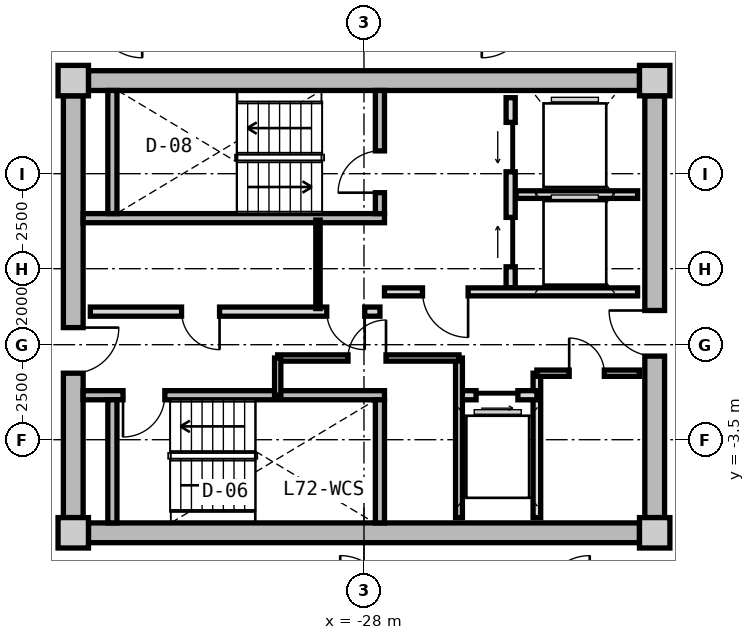
"""IFC4 building model, lengths in metres.
Left out: names, types, materials, properties, quantities, classifications, styles, units other than length and angle.
Written with IfcOpenShell. Run it as: python <this file> out.ifc"""

import sys

from ifc_helpers import new_model, si_unit, direction, frame, frame_2d, origin, origin_2d, place, context, subcontext, project, spatial, rectangle, extrude, source, transform, mapped, element, fill, save


model = new_model("IFC4")
c1 = context("Model", 3, precision=1e-05, world=origin(), true_north=direction((0.0, 1.0)))
c2 = subcontext(c1, "Body", "Model", "MODEL_VIEW")
j1 = project(units=[si_unit("LENGTHUNIT", "METRE"), si_unit("PLANEANGLEUNIT", "RADIAN")], contexts=[c1])
p1 = place(None, origin())
s1 = spatial("IfcSite", under=j1, at=p1, CompositionType="ELEMENT")
p2 = place(p1, origin())
s2 = spatial("IfcBuilding", under=s1, at=p2, CompositionType="ELEMENT")
p3 = place(p2, frame((0.0, 0.0, 232.2)))
s3 = spatial("IfcBuildingStorey", under=s2, at=p3, CompositionType="ELEMENT", Elevation=232.2)
m1 = source(origin(), c2, "Body", "SweptSolid", [
    extrude(rectangle(XDim=0.8, YDim=0.8, at=origin_2d()), origin(), (0.0, 0.0, 1.0), 3.05),
])
for number, where, z_axis, x_axis in (
    (1, (-35.65, -5.95, 0.0), (0.0, 0.0, 1.0), (1.0, 0.0, 0.0)),
    (2, (-20.35, -5.95, 0.0), (0.0, 0.0, 1.0), (1.0, 0.0, 0.0)),
    (3, (-20.35, 5.95, 0.0), (0.0, 0.0, 1.0), (1.0, 0.0, 0.0)),
    (4, (-35.65, 5.95, 0.0), (0.0, 0.0, 1.0), (1.0, 0.0, 0.0)),
):
    element("IfcColumn", number, at=place(p3, frame(where, z_axis=z_axis, x_axis=x_axis)), inside=s3, PredefinedType="COLUMN", context=c2, shape_type="MappedRepresentation", body=[
        mapped(m1, transform((0.0, 0.0, 0.0), x_axis=(1.0, 0.0, 0.0), y_axis=(0.0, 1.0, 0.0), z_axis=(0.0, 0.0, 1.0), scale=1.0)),
    ])
m2 = source(origin(), c2, "Body", "SweptSolid", [
    extrude(rectangle(XDim=14.5, YDim=0.52, at=frame_2d((7.25, 0.0))), origin(), (0.0, 0.0, 1.0), 2.81),
])
for number, where, z_axis, x_axis in (
    (5, (-35.25, 5.95, 0.0), (0.0, 0.0, 1.0), (1.0, 0.0, 0.0)),
    (6, (-20.75, -5.95, 0.0), (0.0, 0.0, 1.0), (-1.0, 0.0, 0.0)),
):
    element("IfcWall", number, at=place(p3, frame(where, z_axis=z_axis, x_axis=x_axis)), inside=s3, PredefinedType="SHEAR", context=c2, shape_type="MappedRepresentation", body=[
        mapped(m2, transform((0.0, 0.0, 0.0), x_axis=(1.0, 0.0, 0.0), y_axis=(0.0, 1.0, 0.0), z_axis=(0.0, 0.0, 1.0), scale=1.0)),
    ])
m3 = source(origin(), c2, "Body", "SweptSolid", [
    extrude(rectangle(XDim=11.1, YDim=0.52, at=frame_2d((5.55, 0.0))), origin(), (0.0, 0.0, 1.0), 2.81),
])
p4 = place(p3, frame((-35.65, -5.55, 0.0), z_axis=(0.0, 0.0, 1.0), x_axis=(0.0, 1.0, 0.0)))
e7 = element("IfcWall", 7, at=p4, inside=s3, PredefinedType="SHEAR", context=c2, shape_type="MappedRepresentation", body=[
    mapped(m3, transform((0.0, 0.0, 0.0), x_axis=(1.0, 0.0, 0.0), y_axis=(0.0, 1.0, 0.0), z_axis=(0.0, 0.0, 1.0), scale=1.0)),
])
p5 = place(p4, frame((3.8, 0.0, 0.0)))
e8 = element("IfcOpeningElement", 8, at=p5, cuts=e7, PredefinedType="OPENING", context=c2, shape_type="SweptSolid", body=[
    extrude(rectangle(XDim=1.2, YDim=2.15, at=frame_2d((0.6, 1.075))), frame((0.0, 0.27, 0.0), z_axis=(0.0, -1.0, 0.0), x_axis=(1.0, 0.0, 0.0)), (0.0, 0.0, 1.0), 0.54),
])
p6 = place(p3, frame((-20.35, 5.55, 0.0), z_axis=(0.0, 0.0, 1.0), x_axis=(0.0, -1.0, 0.0)))
e9 = element("IfcWall", 9, at=p6, inside=s3, PredefinedType="SHEAR", context=c2, shape_type="MappedRepresentation", body=[
    mapped(m3, transform((0.0, 0.0, 0.0), x_axis=(1.0, 0.0, 0.0), y_axis=(0.0, 1.0, 0.0), z_axis=(0.0, 0.0, 1.0), scale=1.0)),
])
p7 = place(p6, frame((5.65, 0.0, 0.0)))
e10 = element("IfcOpeningElement", 10, at=p7, cuts=e9, PredefinedType="OPENING", context=c2, shape_type="SweptSolid", body=[
    extrude(rectangle(XDim=1.2, YDim=2.15, at=frame_2d((0.6, 1.075))), frame((0.0, 0.27, 0.0), z_axis=(0.0, -1.0, 0.0), x_axis=(1.0, 0.0, 0.0)), (0.0, 0.0, 1.0), 0.54),
])
m4 = source(origin(), c2, "Body", "SweptSolid", [
    extrude(rectangle(XDim=7.93, YDim=0.24, at=frame_2d((3.965, 0.0))), origin(), (0.0, 0.0, 1.0), 2.81),
])
p8 = place(p3, frame((-35.39, 2.33, 0.0), z_axis=(0.0, 0.0, 1.0), x_axis=(1.0, 0.0, 0.0)))
e11 = element("IfcWall", 11, at=p8, inside=s3, PredefinedType="PARTITIONING", context=c2, shape_type="MappedRepresentation", body=[
    mapped(m4, transform((0.0, 0.0, 0.0), x_axis=(1.0, 0.0, 0.0), y_axis=(0.0, 1.0, 0.0), z_axis=(0.0, 0.0, 1.0), scale=1.0)),
])
m5 = source(origin(), c2, "Body", "SweptSolid", [
    extrude(rectangle(XDim=3.24, YDim=0.24, at=frame_2d((1.62, 0.0))), origin(), (0.0, 0.0, 1.0), 2.81),
])
p9 = place(p3, frame((-34.62, 2.45, 0.0), z_axis=(0.0, 0.0, 1.0), x_axis=(0.0, 1.0, 0.0)))
e12 = element("IfcWall", 12, at=p9, inside=s3, PredefinedType="PARTITIONING", context=c2, shape_type="MappedRepresentation", body=[
    mapped(m5, transform((0.0, 0.0, 0.0), x_axis=(1.0, 0.0, 0.0), y_axis=(0.0, 1.0, 0.0), z_axis=(0.0, 0.0, 1.0), scale=1.0)),
])
p10 = place(p3, frame((-27.58, 2.45, 0.0), z_axis=(0.0, 0.0, 1.0), x_axis=(0.0, 1.0, 0.0)))
e13 = element("IfcWall", 13, at=p10, inside=s3, PredefinedType="PARTITIONING", context=c2, shape_type="MappedRepresentation", body=[
    mapped(m5, transform((0.0, 0.0, 0.0), x_axis=(1.0, 0.0, 0.0), y_axis=(0.0, 1.0, 0.0), z_axis=(0.0, 0.0, 1.0), scale=1.0)),
])
p11 = place(p10, frame((0.55, 0.0, 0.0)))
e14 = element("IfcOpeningElement", 14, at=p11, cuts=e13, PredefinedType="OPENING", context=c2, shape_type="SweptSolid", body=[
    extrude(rectangle(XDim=1.1, YDim=2.15, at=frame_2d((0.55, 1.075))), frame((0.0, 0.13, 0.0), z_axis=(0.0, -1.0, 0.0), x_axis=(1.0, 0.0, 0.0)), (0.0, 0.0, 1.0), 0.26),
])
p12 = place(p3, frame((-35.39, -2.33, 0.0), z_axis=(0.0, 0.0, 1.0), x_axis=(1.0, 0.0, 0.0)))
e15 = element("IfcWall", 15, at=p12, inside=s3, PredefinedType="PARTITIONING", context=c2, shape_type="MappedRepresentation", body=[
    mapped(m4, transform((0.0, 0.0, 0.0), x_axis=(1.0, 0.0, 0.0), y_axis=(0.0, 1.0, 0.0), z_axis=(0.0, 0.0, 1.0), scale=1.0)),
])
p13 = place(p12, frame((1.05, 0.0, 0.0)))
e16 = element("IfcOpeningElement", 16, at=p13, cuts=e15, PredefinedType="OPENING", context=c2, shape_type="SweptSolid", body=[
    extrude(rectangle(XDim=1.1, YDim=2.15, at=frame_2d((0.55, 1.075))), frame((0.0, 0.13, 0.0), z_axis=(0.0, -1.0, 0.0), x_axis=(1.0, 0.0, 0.0)), (0.0, 0.0, 1.0), 0.26),
])
for number, where, z_axis, x_axis in (
    (17, (-34.62, -5.69, 0.0), (0.0, 0.0, 1.0), (0.0, 1.0, 0.0)),
    (18, (-27.58, -5.69, 0.0), (0.0, 0.0, 1.0), (0.0, 1.0, 0.0)),
):
    element("IfcWall", number, at=place(p3, frame(where, z_axis=z_axis, x_axis=x_axis)), inside=s3, PredefinedType="PARTITIONING", context=c2, shape_type="MappedRepresentation", body=[
        mapped(m5, transform((0.0, 0.0, 0.0), x_axis=(1.0, 0.0, 0.0), y_axis=(0.0, 1.0, 0.0), z_axis=(0.0, 0.0, 1.0), scale=1.0)),
    ])
m6 = source(origin(), c2, "Body", "SweptSolid", [
    extrude(rectangle(XDim=5.0, YDim=0.24, at=frame_2d((2.5, 0.0))), origin(), (0.0, 0.0, 1.0), 2.795),
])
p14 = place(p3, frame((-24.14, 0.5, 0.0), z_axis=(0.0, 0.0, 1.0), x_axis=(0.0, 1.0, 0.0)))
e19 = element("IfcWall", 19, at=p14, inside=s3, PredefinedType="PARTITIONING", context=c2, shape_type="MappedRepresentation", body=[
    mapped(m6, transform((0.0, 0.0, 0.0), x_axis=(1.0, 0.0, 0.0), y_axis=(0.0, 1.0, 0.0), z_axis=(0.0, 0.0, 1.0), scale=1.0)),
])
p15 = place(p14, frame((3.05, 0.0, 0.0)))
e20 = element("IfcOpeningElement", 20, at=p15, cuts=e19, PredefinedType="OPENING", context=c2, shape_type="SweptSolid", body=[
    extrude(rectangle(XDim=1.3, YDim=2.2, at=frame_2d((0.65, 1.1))), frame((0.0, 0.13, 0.0), z_axis=(0.0, -1.0, 0.0), x_axis=(1.0, 0.0, 0.0)), (0.0, 0.0, 1.0), 0.26),
])
p16 = place(p14, frame((0.55, 0.0, 0.0)))
e21 = element("IfcOpeningElement", 21, at=p16, cuts=e19, PredefinedType="OPENING", context=c2, shape_type="SweptSolid", body=[
    extrude(rectangle(XDim=1.3, YDim=2.2, at=frame_2d((0.65, 1.1))), frame((0.0, 0.13, 0.0), z_axis=(0.0, -1.0, 0.0), x_axis=(1.0, 0.0, 0.0)), (0.0, 0.0, 1.0), 0.26),
])
m7 = source(origin(), c2, "Body", "SweptSolid", [
    extrude(rectangle(XDim=3.2, YDim=0.2, at=frame_2d((1.6, 0.0))), origin(), (0.0, 0.0, 1.0), 2.795),
])
p17 = place(p3, frame((-24.0, 2.95, 0.0), z_axis=(0.0, 0.0, 1.0), x_axis=(1.0, 0.0, 0.0)))
e22 = element("IfcWall", 22, at=p17, inside=s3, PredefinedType="PARTITIONING", context=c2, shape_type="MappedRepresentation", body=[
    mapped(m7, transform((0.0, 0.0, 0.0), x_axis=(1.0, 0.0, 0.0), y_axis=(0.0, 1.0, 0.0), z_axis=(0.0, 0.0, 1.0), scale=1.0)),
])
m8 = source(origin(), c2, "Body", "SweptSolid", [
    extrude(rectangle(XDim=6.66, YDim=0.21, at=frame_2d((3.33, 0.0))), origin(), (0.0, 0.0, 1.0), 2.795),
])
p18 = place(p3, frame((-27.46, 0.39, 0.0), z_axis=(0.0, 0.0, 1.0), x_axis=(1.0, 0.0, 0.0)))
e23 = element("IfcWall", 23, at=p18, inside=s3, PredefinedType="PARTITIONING", context=c2, shape_type="MappedRepresentation", body=[
    mapped(m8, transform((0.0, 0.0, 0.0), x_axis=(1.0, 0.0, 0.0), y_axis=(0.0, 1.0, 0.0), z_axis=(0.0, 0.0, 1.0), scale=1.0)),
])
p19 = place(p18, frame((1.0, 0.0, 0.0)))
e24 = element("IfcOpeningElement", 24, at=p19, cuts=e23, PredefinedType="OPENING", context=c2, shape_type="SweptSolid", body=[
    extrude(rectangle(XDim=1.2, YDim=2.15, at=frame_2d((0.6, 1.075))), frame((0.0, 0.115, 0.0), z_axis=(0.0, -1.0, 0.0), x_axis=(1.0, 0.0, 0.0)), (0.0, 0.0, 1.0), 0.23),
])
m9 = source(origin(), c2, "Body", "SweptSolid", [
    extrude(rectangle(XDim=7.62, YDim=0.24, at=frame_2d((3.81, 0.0))), origin(), (0.0, 0.0, 1.0), 2.795),
])
p20 = place(p3, frame((-35.2, -0.13, 0.0), z_axis=(0.0, 0.0, 1.0), x_axis=(1.0, 0.0, 0.0)))
e25 = element("IfcWall", 25, at=p20, inside=s3, PredefinedType="PARTITIONING", context=c2, shape_type="MappedRepresentation", body=[
    mapped(m9, transform((0.0, 0.0, 0.0), x_axis=(1.0, 0.0, 0.0), y_axis=(0.0, 1.0, 0.0), z_axis=(0.0, 0.0, 1.0), scale=1.0)),
])
p21 = place(p20, frame((6.22, 0.0, 0.0)))
e26 = element("IfcOpeningElement", 26, at=p21, cuts=e25, PredefinedType="OPENING", context=c2, shape_type="SweptSolid", body=[
    extrude(rectangle(XDim=1.0, YDim=2.1, at=frame_2d((0.5, 1.05))), frame((0.0, 0.13, 0.0), z_axis=(0.0, -1.0, 0.0), x_axis=(1.0, 0.0, 0.0)), (0.0, 0.0, 1.0), 0.26),
])
p22 = place(p20, frame((2.4, 0.0, 0.0)))
e27 = element("IfcOpeningElement", 27, at=p22, cuts=e25, PredefinedType="OPENING", context=c2, shape_type="SweptSolid", body=[
    extrude(rectangle(XDim=1.0, YDim=2.1, at=frame_2d((0.5, 1.05))), frame((0.0, 0.13, 0.0), z_axis=(0.0, -1.0, 0.0), x_axis=(1.0, 0.0, 0.0)), (0.0, 0.0, 1.0), 0.26),
])
m10 = source(origin(), c2, "Body", "SweptSolid", [
    extrude(rectangle(XDim=2.33, YDim=0.115, at=frame_2d((1.165, 0.0))), origin(), (0.0, 0.0, 1.0), 2.795),
])
p23 = place(p3, frame((-29.21, -0.05, 0.0), z_axis=(0.0, 0.0, 1.0), x_axis=(0.0, 1.0, 0.0)))
e28 = element("IfcWall", 28, at=p23, inside=s3, PredefinedType="PARTITIONING", context=c2, shape_type="MappedRepresentation", body=[
    mapped(m10, transform((0.0, 0.0, 0.0), x_axis=(1.0, 0.0, 0.0), y_axis=(0.0, 1.0, 0.0), z_axis=(0.0, 0.0, 1.0), scale=1.0)),
])
m11 = source(origin(), c2, "Body", "SweptSolid", [
    extrude(rectangle(XDim=3.8, YDim=0.2, at=frame_2d((1.9, 0.0))), origin(), (0.0, 0.0, 1.0), 2.795),
])
p24 = place(p3, frame((-23.45, -5.55, 0.0), z_axis=(0.0, 0.0, 1.0), x_axis=(0.0, 1.0, 0.0)))
e29 = element("IfcWall", 29, at=p24, inside=s3, PredefinedType="PARTITIONING", context=c2, shape_type="MappedRepresentation", body=[
    mapped(m11, transform((0.0, 0.0, 0.0), x_axis=(1.0, 0.0, 0.0), y_axis=(0.0, 1.0, 0.0), z_axis=(0.0, 0.0, 1.0), scale=1.0)),
])
m12 = source(origin(), c2, "Body", "SweptSolid", [
    extrude(rectangle(XDim=2.05, YDim=0.24, at=frame_2d((1.025, 0.0))), origin(), (0.0, 0.0, 1.0), 2.795),
])
p25 = place(p3, frame((-25.5, -2.33, 0.0), z_axis=(0.0, 0.0, 1.0), x_axis=(1.0, 0.0, 0.0)))
e30 = element("IfcWall", 30, at=p25, inside=s3, PredefinedType="PARTITIONING", context=c2, shape_type="MappedRepresentation", body=[
    mapped(m12, transform((0.0, 0.0, 0.0), x_axis=(1.0, 0.0, 0.0), y_axis=(0.0, 1.0, 0.0), z_axis=(0.0, 0.0, 1.0), scale=1.0)),
])
p26 = place(p25, frame((0.45, 0.0, 0.0)))
e31 = element("IfcOpeningElement", 31, at=p26, cuts=e30, PredefinedType="OPENING", context=c2, shape_type="SweptSolid", body=[
    extrude(rectangle(XDim=1.1, YDim=2.2, at=frame_2d((0.55, 1.1))), frame((0.0, 0.13, 0.0), z_axis=(0.0, -1.0, 0.0), x_axis=(1.0, 0.0, 0.0)), (0.0, 0.0, 1.0), 0.26),
])
m13 = source(origin(), c2, "Body", "SweptSolid", [
    extrude(rectangle(XDim=4.2, YDim=0.18, at=frame_2d((2.1, 0.0))), origin(), (0.0, 0.0, 1.0), 2.795),
])
p27 = place(p3, frame((-25.5, -5.55, 0.0), z_axis=(0.0, 0.0, 1.0), x_axis=(0.0, 1.0, 0.0)))
e32 = element("IfcWall", 32, at=p27, inside=s3, PredefinedType="PARTITIONING", context=c2, shape_type="MappedRepresentation", body=[
    mapped(m13, transform((0.0, 0.0, 0.0), x_axis=(1.0, 0.0, 0.0), y_axis=(0.0, 1.0, 0.0), z_axis=(0.0, 0.0, 1.0), scale=1.0)),
])
m14 = source(origin(), c2, "Body", "SweptSolid", [
    extrude(rectangle(XDim=4.77, YDim=0.165, at=frame_2d((2.385, 0.0))), origin(), (0.0, 0.0, 1.0), 2.795),
])
p28 = place(p3, frame((-30.27, -1.35, 0.0), z_axis=(0.0, 0.0, 1.0), x_axis=(1.0, 0.0, 0.0)))
e33 = element("IfcWall", 33, at=p28, inside=s3, PredefinedType="PARTITIONING", context=c2, shape_type="MappedRepresentation", body=[
    mapped(m14, transform((0.0, 0.0, 0.0), x_axis=(1.0, 0.0, 0.0), y_axis=(0.0, 1.0, 0.0), z_axis=(0.0, 0.0, 1.0), scale=1.0)),
])
p29 = place(p28, frame((1.85, 0.0, 0.0)))
e34 = element("IfcOpeningElement", 34, at=p29, cuts=e33, PredefinedType="OPENING", context=c2, shape_type="SweptSolid", body=[
    extrude(rectangle(XDim=1.0, YDim=2.1, at=frame_2d((0.5, 1.05))), frame((0.0, 0.093, 0.0), z_axis=(0.0, -1.0, 0.0), x_axis=(1.0, 0.0, 0.0)), (0.0, 0.0, 1.0), 0.185),
])
m15 = source(origin(), c2, "Body", "SweptSolid", [
    extrude(rectangle(XDim=0.98, YDim=0.165, at=frame_2d((0.49, 0.0))), origin(), (0.0, 0.0, 1.0), 2.795),
])
p30 = place(p3, frame((-30.27, -2.33, 0.0), z_axis=(0.0, 0.0, 1.0), x_axis=(0.0, 1.0, 0.0)))
e35 = element("IfcWall", 35, at=p30, inside=s3, PredefinedType="PARTITIONING", context=c2, shape_type="MappedRepresentation", body=[
    mapped(m15, transform((0.0, 0.0, 0.0), x_axis=(1.0, 0.0, 0.0), y_axis=(0.0, 1.0, 0.0), z_axis=(0.0, 0.0, 1.0), scale=1.0)),
])
m16 = source(origin(), c2, "Body", "SweptSolid", [
    extrude(rectangle(XDim=2.7, YDim=0.165, at=frame_2d((1.35, 0.0))), origin(), (0.0, 0.0, 1.0), 2.795),
])
p31 = place(p3, frame((-23.45, -1.75, 0.0), z_axis=(0.0, 0.0, 1.0), x_axis=(1.0, 0.0, 0.0)))
e36 = element("IfcWall", 36, at=p31, inside=s3, PredefinedType="PARTITIONING", context=c2, shape_type="MappedRepresentation", body=[
    mapped(m16, transform((0.0, 0.0, 0.0), x_axis=(1.0, 0.0, 0.0), y_axis=(0.0, 1.0, 0.0), z_axis=(0.0, 0.0, 1.0), scale=1.0)),
])
p32 = place(p31, frame((0.85, 0.0, 0.0)))
e37 = element("IfcOpeningElement", 37, at=p32, cuts=e36, PredefinedType="OPENING", context=c2, shape_type="SweptSolid", body=[
    extrude(rectangle(XDim=0.925, YDim=2.1, at=frame_2d((0.462, 1.05))), frame((0.0, 0.093, 0.0), z_axis=(0.0, -1.0, 0.0), x_axis=(1.0, 0.0, 0.0)), (0.0, 0.0, 1.0), 0.185),
])
m17 = source(origin(), c2, "Body", "SweptSolid", [
    extrude(rectangle(XDim=1.1, YDim=2.15, at=frame_2d((0.55, 1.075))), frame((0.0, 0.025, 0.0), z_axis=(0.0, -1.0, 0.0), x_axis=(1.0, 0.0, 0.0)), (0.0, 0.0, 1.0), 0.05),
])
p33 = place(p11, origin())
e38 = element("IfcDoor", 38, at=p33, inside=s3, OperationType="SINGLE_SWING_LEFT", PredefinedType="DOOR", context=c2, shape_type="MappedRepresentation", body=[
    mapped(m17, transform((0.0, 0.0, 0.0), x_axis=(1.0, 0.0, 0.0), y_axis=(0.0, 1.0, 0.0), z_axis=(0.0, 0.0, 1.0), scale=1.0)),
])
fill(e14, e38)
p34 = place(p13, frame((1.1, 0.0, 0.0), z_axis=(0.0, 0.0, 1.0), x_axis=(-1.0, 0.0, 0.0)))
e39 = element("IfcDoor", 39, at=p34, inside=s3, OperationType="SINGLE_SWING_RIGHT", PredefinedType="DOOR", context=c2, shape_type="MappedRepresentation", body=[
    mapped(m17, transform((0.0, 0.0, 0.0), x_axis=(1.0, 0.0, 0.0), y_axis=(0.0, 1.0, 0.0), z_axis=(0.0, 0.0, 1.0), scale=1.0)),
])
fill(e16, e39)
m18 = source(origin(), c2, "Body", "SweptSolid", [
    extrude(rectangle(XDim=1.3, YDim=2.2, at=frame_2d((0.65, 1.1))), frame((0.0, 0.025, 0.0), z_axis=(0.0, -1.0, 0.0), x_axis=(1.0, 0.0, 0.0)), (0.0, 0.0, 1.0), 0.05),
])
p35 = place(p15, origin())
e40 = element("IfcDoor", 40, at=p35, inside=s3, OperationType="SLIDING_TO_LEFT", PredefinedType="DOOR", context=c2, shape_type="MappedRepresentation", body=[
    mapped(m18, transform((0.0, 0.0, 0.0), x_axis=(1.0, 0.0, 0.0), y_axis=(0.0, 1.0, 0.0), z_axis=(0.0, 0.0, 1.0), scale=1.0)),
])
fill(e20, e40)
p36 = place(p16, origin())
e41 = element("IfcDoor", 41, at=p36, inside=s3, OperationType="SLIDING_TO_RIGHT", PredefinedType="DOOR", context=c2, shape_type="MappedRepresentation", body=[
    mapped(m18, transform((0.0, 0.0, 0.0), x_axis=(1.0, 0.0, 0.0), y_axis=(0.0, 1.0, 0.0), z_axis=(0.0, 0.0, 1.0), scale=1.0)),
])
fill(e21, e41)
m19 = source(origin(), c2, "Body", "SweptSolid", [
    extrude(rectangle(XDim=1.2, YDim=2.15, at=frame_2d((0.6, 1.075))), frame((0.0, 0.025, 0.0), z_axis=(0.0, -1.0, 0.0), x_axis=(1.0, 0.0, 0.0)), (0.0, 0.0, 1.0), 0.05),
])
p37 = place(p19, frame((1.2, 0.0, 0.0), z_axis=(0.0, 0.0, 1.0), x_axis=(-1.0, 0.0, 0.0)))
e42 = element("IfcDoor", 42, at=p37, inside=s3, OperationType="SINGLE_SWING_LEFT", PredefinedType="DOOR", context=c2, shape_type="MappedRepresentation", body=[
    mapped(m19, transform((0.0, 0.0, 0.0), x_axis=(1.0, 0.0, 0.0), y_axis=(0.0, 1.0, 0.0), z_axis=(0.0, 0.0, 1.0), scale=1.0)),
])
fill(e24, e42)
p38 = place(p5, frame((1.2, 0.0, 0.0), z_axis=(0.0, 0.0, 1.0), x_axis=(-1.0, 0.0, 0.0)))
e43 = element("IfcDoor", 43, at=p38, inside=s3, OperationType="SINGLE_SWING_LEFT", PredefinedType="DOOR", context=c2, shape_type="MappedRepresentation", body=[
    mapped(m19, transform((0.0, 0.0, 0.0), x_axis=(1.0, 0.0, 0.0), y_axis=(0.0, 1.0, 0.0), z_axis=(0.0, 0.0, 1.0), scale=1.0)),
])
fill(e8, e43)
p39 = place(p7, frame((1.2, 0.0, 0.0), z_axis=(0.0, 0.0, 1.0), x_axis=(-1.0, 0.0, 0.0)))
e44 = element("IfcDoor", 44, at=p39, inside=s3, OperationType="SINGLE_SWING_RIGHT", PredefinedType="DOOR", context=c2, shape_type="MappedRepresentation", body=[
    mapped(m19, transform((0.0, 0.0, 0.0), x_axis=(1.0, 0.0, 0.0), y_axis=(0.0, 1.0, 0.0), z_axis=(0.0, 0.0, 1.0), scale=1.0)),
])
fill(e10, e44)
m20 = source(origin(), c2, "Body", "SweptSolid", [
    extrude(rectangle(XDim=1.0, YDim=2.1, at=frame_2d((0.5, 1.05))), frame((0.0, 0.025, 0.0), z_axis=(0.0, -1.0, 0.0), x_axis=(1.0, 0.0, 0.0)), (0.0, 0.0, 1.0), 0.05),
])
p40 = place(p21, frame((1.0, 0.0, 0.0), z_axis=(0.0, 0.0, 1.0), x_axis=(-1.0, 0.0, 0.0)))
e45 = element("IfcDoor", 45, at=p40, inside=s3, OperationType="SINGLE_SWING_LEFT", PredefinedType="DOOR", context=c2, shape_type="MappedRepresentation", body=[
    mapped(m20, transform((0.0, 0.0, 0.0), x_axis=(1.0, 0.0, 0.0), y_axis=(0.0, 1.0, 0.0), z_axis=(0.0, 0.0, 1.0), scale=1.0)),
])
fill(e26, e45)
p41 = place(p22, frame((1.0, 0.0, 0.0), z_axis=(0.0, 0.0, 1.0), x_axis=(-1.0, 0.0, 0.0)))
e46 = element("IfcDoor", 46, at=p41, inside=s3, OperationType="SINGLE_SWING_LEFT", PredefinedType="DOOR", context=c2, shape_type="MappedRepresentation", body=[
    mapped(m20, transform((0.0, 0.0, 0.0), x_axis=(1.0, 0.0, 0.0), y_axis=(0.0, 1.0, 0.0), z_axis=(0.0, 0.0, 1.0), scale=1.0)),
])
fill(e27, e46)
m21 = source(origin(), c2, "Body", "SweptSolid", [
    extrude(rectangle(XDim=1.1, YDim=2.2, at=frame_2d((0.55, 1.1))), frame((0.0, 0.025, 0.0), z_axis=(0.0, -1.0, 0.0), x_axis=(1.0, 0.0, 0.0)), (0.0, 0.0, 1.0), 0.05),
])
p42 = place(p26, frame((1.1, 0.0, 0.0), z_axis=(0.0, 0.0, 1.0), x_axis=(-1.0, 0.0, 0.0)))
e47 = element("IfcDoor", 47, at=p42, inside=s3, OperationType="SLIDING_TO_RIGHT", PredefinedType="DOOR", context=c2, shape_type="MappedRepresentation", body=[
    mapped(m21, transform((0.0, 0.0, 0.0), x_axis=(1.0, 0.0, 0.0), y_axis=(0.0, 1.0, 0.0), z_axis=(0.0, 0.0, 1.0), scale=1.0)),
])
fill(e31, e47)
p43 = place(p29, origin())
e48 = element("IfcDoor", 48, at=p43, inside=s3, OperationType="SINGLE_SWING_RIGHT", PredefinedType="DOOR", context=c2, shape_type="MappedRepresentation", body=[
    mapped(m20, transform((0.0, 0.0, 0.0), x_axis=(1.0, 0.0, 0.0), y_axis=(0.0, 1.0, 0.0), z_axis=(0.0, 0.0, 1.0), scale=1.0)),
])
fill(e34, e48)
m22 = source(origin(), c2, "Body", "SweptSolid", [
    extrude(rectangle(XDim=0.925, YDim=2.1, at=frame_2d((0.462, 1.05))), frame((0.0, 0.025, 0.0), z_axis=(0.0, -1.0, 0.0), x_axis=(1.0, 0.0, 0.0)), (0.0, 0.0, 1.0), 0.05),
])
p44 = place(p32, origin())
e49 = element("IfcDoor", 49, at=p44, inside=s3, OperationType="SINGLE_SWING_LEFT", PredefinedType="DOOR", context=c2, shape_type="MappedRepresentation", body=[
    mapped(m22, transform((0.0, 0.0, 0.0), x_axis=(1.0, 0.0, 0.0), y_axis=(0.0, 1.0, 0.0), z_axis=(0.0, 0.0, 1.0), scale=1.0)),
])
fill(e37, e49)
save(model, sys.argv[1])
